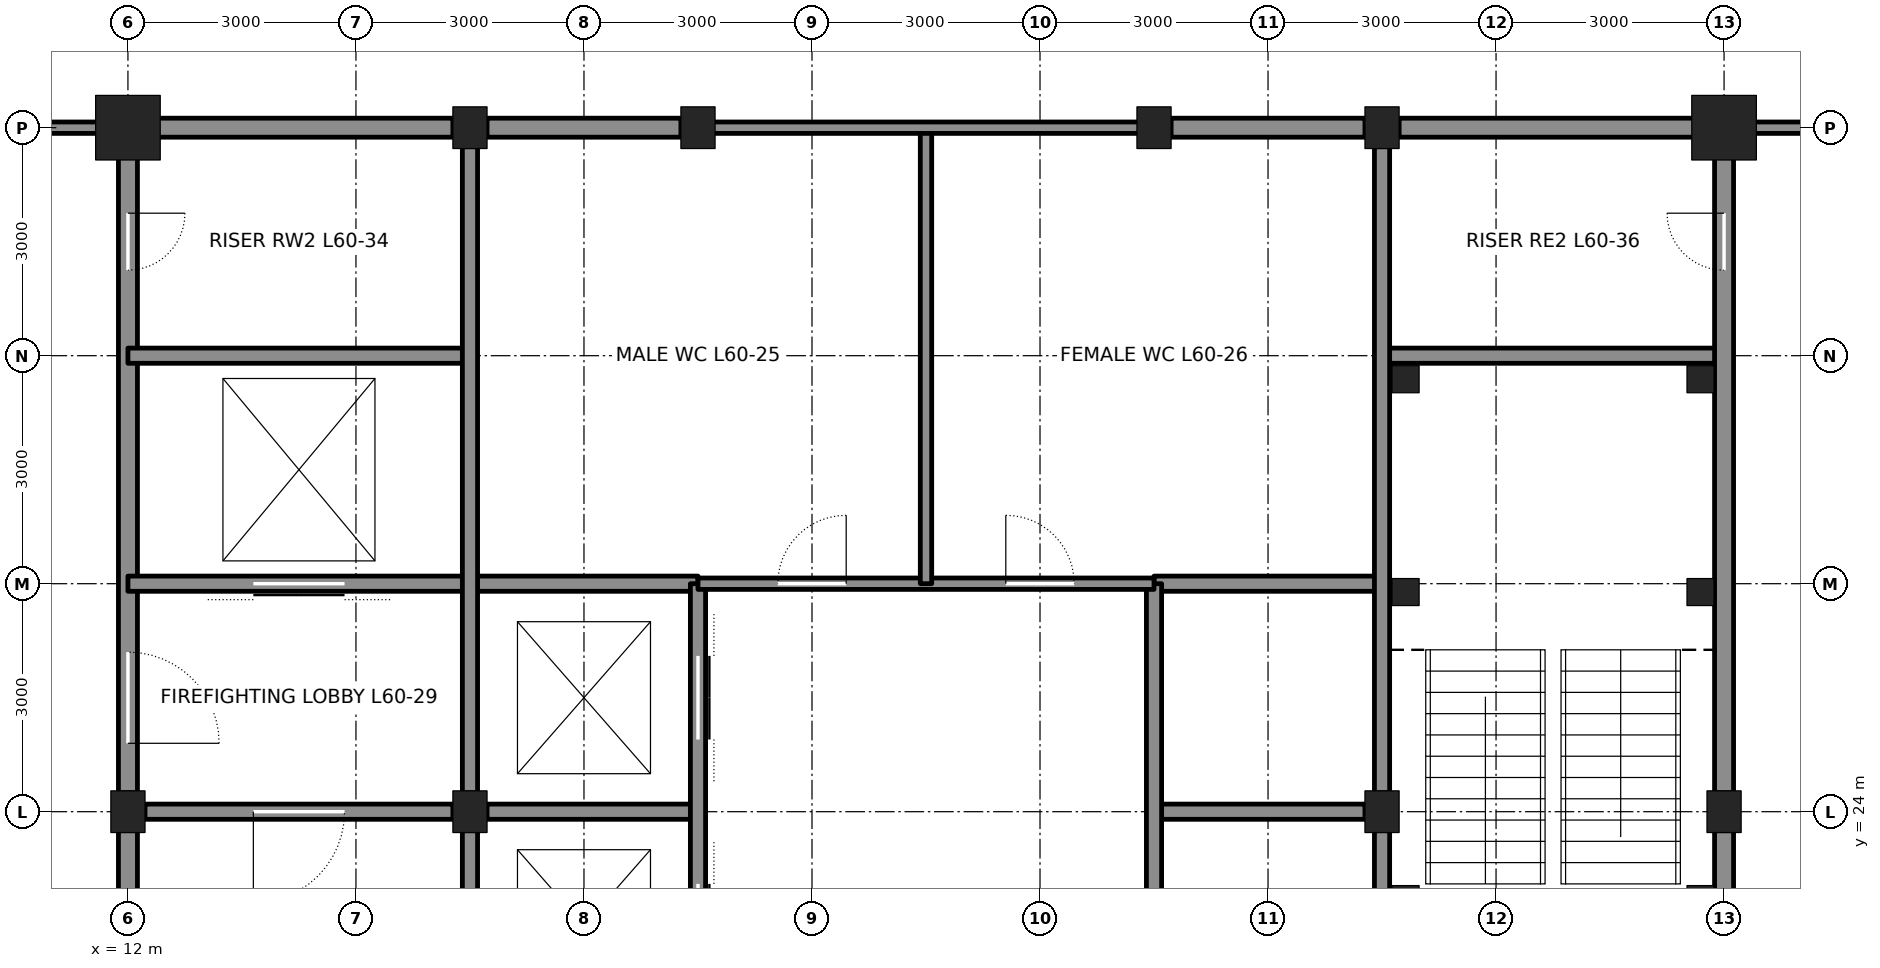
"""IFC4 building model, lengths in metres.
Left out: names, types, materials, properties, quantities, classifications, styles, units other than length and angle.
Written with IfcOpenShell. Run it as: python <this file> out.ifc"""

import sys

from ifc_helpers import new_model, si_unit, direction, frame, frame_2d, origin, origin_2d, place, context, subcontext, project, spatial, rectangle, hollow_rectangle, i_section, extrude, element, fill, save


model = new_model("IFC4")
c1 = context("Model", 3, precision=1e-05, world=origin(), true_north=direction((0.0, 1.0)))
c2 = subcontext(c1, "Body", "Model", "MODEL_VIEW")
j1 = project(units=[si_unit("LENGTHUNIT", "METRE"), si_unit("PLANEANGLEUNIT", "RADIAN")], contexts=[c1])
p1 = place(None, origin())
s1 = spatial("IfcSite", under=j1, at=p1, CompositionType="ELEMENT")
p2 = place(p1, origin())
s2 = spatial("IfcBuilding", under=s1, at=p2, CompositionType="ELEMENT")
p3 = place(p2, frame((0.0, 0.0, 270.6)))
s3 = spatial("IfcBuildingStorey", under=s2, at=p3, CompositionType="ELEMENT", Elevation=270.6)
p4 = place(p3, frame((12.0, 33.0, 0.0), z_axis=(0.0, 0.0, 1.0), x_axis=(1.0, 0.0, 0.0)))
e1 = element("IfcColumn", 1, at=p4, inside=s3, PredefinedType="COLUMN", context=c2, shape_type="SweptSolid", body=[
    extrude(hollow_rectangle(XDim=0.85, YDim=0.85, WallThickness=0.085, at=origin_2d()), origin(), (0.0, 0.0, 1.0), 4.2),
])
for number, where, z_axis, x_axis in (
    (2, (16.5, 33.0, 0.0), (0.0, 0.0, 1.0), (1.0, 0.0, 0.0)),
    (3, (19.5, 33.0, 0.0), (0.0, 0.0, 1.0), (1.0, 0.0, 0.0)),
    (4, (25.5, 33.0, 0.0), (0.0, 0.0, 1.0), (1.0, 0.0, 0.0)),
    (5, (28.5, 33.0, 0.0), (0.0, 0.0, 1.0), (1.0, 0.0, 0.0)),
):
    element("IfcColumn", number, at=place(p3, frame(where, z_axis=z_axis, x_axis=x_axis)), inside=s3, PredefinedType="COLUMN", context=c2, shape_type="SweptSolid", body=[
        extrude(i_section(OverallWidth=0.449, OverallDepth=0.549, WebThickness=0.072, FlangeThickness=0.115, at=origin_2d()), origin(), (0.0, 0.0, 1.0), 4.2),
    ])
p5 = place(p3, frame((33.0, 33.0, 0.0), z_axis=(0.0, 0.0, 1.0), x_axis=(1.0, 0.0, 0.0)))
e6 = element("IfcColumn", 6, at=p5, inside=s3, PredefinedType="COLUMN", context=c2, shape_type="SweptSolid", body=[
    extrude(hollow_rectangle(XDim=0.85, YDim=0.85, WallThickness=0.085, at=origin_2d()), origin(), (0.0, 0.0, 1.0), 4.2),
])
for number, where, z_axis, x_axis in (
    (7, (12.0, 24.0, 0.0), (0.0, 0.0, 1.0), (1.0, 0.0, 0.0)),
    (8, (33.0, 24.0, 0.0), (0.0, 0.0, 1.0), (1.0, 0.0, 0.0)),
    (9, (16.5, 24.0, 0.0), (0.0, 0.0, 1.0), (1.0, 0.0, 0.0)),
    (10, (28.5, 24.0, 0.0), (0.0, 0.0, 1.0), (1.0, 0.0, 0.0)),
):
    element("IfcColumn", number, at=place(p3, frame(where, z_axis=z_axis, x_axis=x_axis)), inside=s3, PredefinedType="COLUMN", context=c2, shape_type="SweptSolid", body=[
        extrude(i_section(OverallWidth=0.449, OverallDepth=0.549, WebThickness=0.072, FlangeThickness=0.115, at=origin_2d()), origin(), (0.0, 0.0, 1.0), 4.2),
    ])
p6 = place(p3, frame((12.0, 21.25, 0.0), z_axis=(0.0, 0.0, 1.0), x_axis=(0.0, 1.0, 0.0)))
e11 = element("IfcWall", 11, at=p6, inside=s3, PredefinedType="SOLIDWALL", context=c2, shape_type="SweptSolid", body=[
    extrude(rectangle(XDim=2.5, YDim=0.25, at=frame_2d((1.25, 0.0))), origin(), (0.0, 0.0, 1.0), 3.113),
])
p7 = place(p3, frame((12.0, 24.25, 0.0), z_axis=(0.0, 0.0, 1.0), x_axis=(0.0, 1.0, 0.0)))
e12 = element("IfcWall", 12, at=p7, inside=s3, PredefinedType="SOLIDWALL", context=c2, shape_type="SweptSolid", body=[
    extrude(rectangle(XDim=8.5, YDim=0.25, at=frame_2d((4.25, 0.0))), origin(), (0.0, 0.0, 1.0), 3.113),
])
p8 = place(p7, frame((0.65, 0.0, 0.0)))
e13 = element("IfcOpeningElement", 13, at=p8, cuts=e12, PredefinedType="OPENING", context=c2, shape_type="SweptSolid", body=[
    extrude(rectangle(XDim=1.2, YDim=2.1, at=frame_2d((0.6, 1.05))), frame((0.0, 0.135, 0.0), z_axis=(0.0, -1.0, 0.0), x_axis=(1.0, 0.0, 0.0)), (0.0, 0.0, 1.0), 0.27),
])
p9 = place(p7, frame((6.875, 0.0, 0.0)))
e14 = element("IfcOpeningElement", 14, at=p9, cuts=e12, PredefinedType="OPENING", context=c2, shape_type="SweptSolid", body=[
    extrude(rectangle(XDim=0.75, YDim=2.1, at=frame_2d((0.375, 1.05))), frame((0.0, 0.135, 0.0), z_axis=(0.0, -1.0, 0.0), x_axis=(1.0, 0.0, 0.0)), (0.0, 0.0, 1.0), 0.27),
])
p10 = place(p3, frame((12.225, 24.0, 0.0), z_axis=(0.0, 0.0, 1.0), x_axis=(1.0, 0.0, 0.0)))
e15 = element("IfcWall", 15, at=p10, inside=s3, PredefinedType="SOLIDWALL", context=c2, shape_type="SweptSolid", body=[
    extrude(rectangle(XDim=4.05, YDim=0.2, at=frame_2d((2.025, 0.0))), origin(), (0.0, 0.0, 1.0), 3.09),
])
p11 = place(p10, frame((1.425, 0.0, 0.0)))
e16 = element("IfcOpeningElement", 16, at=p11, cuts=e15, PredefinedType="OPENING", context=c2, shape_type="SweptSolid", body=[
    extrude(rectangle(XDim=1.2, YDim=2.1, at=frame_2d((0.6, 1.05))), frame((0.0, 0.11, 0.0), z_axis=(0.0, -1.0, 0.0), x_axis=(1.0, 0.0, 0.0)), (0.0, 0.0, 1.0), 0.22),
])
for number, where, z_axis, x_axis in (
    (17, (16.725, 24.0, 0.0), (0.0, 0.0, 1.0), (1.0, 0.0, 0.0)),
    (18, (25.5, 24.0, 0.0), (0.0, 0.0, 1.0), (1.0, 0.0, 0.0)),
):
    element("IfcWall", number, at=place(p3, frame(where, z_axis=z_axis, x_axis=x_axis)), inside=s3, PredefinedType="SOLIDWALL", context=c2, shape_type="SweptSolid", body=[
        extrude(rectangle(XDim=2.775, YDim=0.2, at=frame_2d((1.388, 0.0))), origin(), (0.0, 0.0, 1.0), 3.09),
    ])
p12 = place(p3, frame((12.0, 27.0, 0.0), z_axis=(0.0, 0.0, 1.0), x_axis=(1.0, 0.0, 0.0)))
e19 = element("IfcWall", 19, at=p12, inside=s3, PredefinedType="SOLIDWALL", context=c2, shape_type="SweptSolid", body=[
    extrude(rectangle(XDim=7.5, YDim=0.2, at=frame_2d((3.75, 0.0))), origin(), (0.0, 0.0, 1.0), 4.04),
])
p13 = place(p12, frame((1.65, 0.0, 0.0)))
e20 = element("IfcOpeningElement", 20, at=p13, cuts=e19, PredefinedType="OPENING", context=c2, shape_type="SweptSolid", body=[
    extrude(rectangle(XDim=1.2, YDim=2.1, at=frame_2d((0.6, 1.05))), frame((0.0, 0.11, 0.0), z_axis=(0.0, -1.0, 0.0), x_axis=(1.0, 0.0, 0.0)), (0.0, 0.0, 1.0), 0.22),
])
p14 = place(p3, frame((25.5, 27.0, 0.0), z_axis=(0.0, 0.0, 1.0), x_axis=(1.0, 0.0, 0.0)))
e21 = element("IfcWall", 21, at=p14, inside=s3, PredefinedType="SOLIDWALL", context=c2, shape_type="SweptSolid", body=[
    extrude(rectangle(XDim=3.0, YDim=0.2, at=frame_2d((1.5, 0.0))), origin(), (0.0, 0.0, 1.0), 4.04),
])
for number, where, z_axis, x_axis in (
    (22, (12.0, 30.0, 0.0), (0.0, 0.0, 1.0), (1.0, 0.0, 0.0)),
    (23, (28.5, 30.0, 0.0), (0.0, 0.0, 1.0), (1.0, 0.0, 0.0)),
):
    element("IfcWall", number, at=place(p3, frame(where, z_axis=z_axis, x_axis=x_axis)), inside=s3, PredefinedType="SOLIDWALL", context=c2, shape_type="SweptSolid", body=[
        extrude(rectangle(XDim=4.5, YDim=0.2, at=frame_2d((2.25, 0.0))), origin(), (0.0, 0.0, 1.0), 4.04),
    ])
p15 = place(p3, frame((12.25, 33.0, 0.0), z_axis=(0.0, 0.0, 1.0), x_axis=(1.0, 0.0, 0.0)))
e24 = element("IfcWall", 24, at=p15, inside=s3, PredefinedType="SOLIDWALL", context=c2, shape_type="SweptSolid", body=[
    extrude(rectangle(XDim=4.025, YDim=0.25, at=frame_2d((2.013, 0.0))), origin(), (0.0, 0.0, 1.0), 3.181),
])
for number, where, z_axis, x_axis in (
    (25, (16.725, 33.0, 0.0), (0.0, 0.0, 1.0), (1.0, 0.0, 0.0)),
    (26, (25.725, 33.0, 0.0), (0.0, 0.0, 1.0), (1.0, 0.0, 0.0)),
):
    element("IfcWall", number, at=place(p3, frame(where, z_axis=z_axis, x_axis=x_axis)), inside=s3, PredefinedType="SOLIDWALL", context=c2, shape_type="SweptSolid", body=[
        extrude(rectangle(XDim=2.55, YDim=0.25, at=frame_2d((1.275, 0.0))), origin(), (0.0, 0.0, 1.0), 3.181),
    ])
p16 = place(p3, frame((28.725, 33.0, 0.0), z_axis=(0.0, 0.0, 1.0), x_axis=(1.0, 0.0, 0.0)))
e27 = element("IfcWall", 27, at=p16, inside=s3, PredefinedType="SOLIDWALL", context=c2, shape_type="SweptSolid", body=[
    extrude(rectangle(XDim=4.025, YDim=0.25, at=frame_2d((2.013, 0.0))), origin(), (0.0, 0.0, 1.0), 3.181),
])
p17 = place(p3, frame((16.5, 21.25, 0.0), z_axis=(0.0, 0.0, 1.0), x_axis=(0.0, 1.0, 0.0)))
e28 = element("IfcWall", 28, at=p17, inside=s3, PredefinedType="SOLIDWALL", context=c2, shape_type="SweptSolid", body=[
    extrude(rectangle(XDim=2.5, YDim=0.2, at=frame_2d((1.25, 0.0))), origin(), (0.0, 0.0, 1.0), 3.113),
])
p18 = place(p3, frame((16.5, 24.25, 0.0), z_axis=(0.0, 0.0, 1.0), x_axis=(0.0, 1.0, 0.0)))
e29 = element("IfcWall", 29, at=p18, inside=s3, PredefinedType="SOLIDWALL", context=c2, shape_type="SweptSolid", body=[
    extrude(rectangle(XDim=8.5, YDim=0.2, at=frame_2d((4.25, 0.0))), origin(), (0.0, 0.0, 1.0), 3.113),
])
p19 = place(p3, frame((19.5, 15.0, 0.0), z_axis=(0.0, 0.0, 1.0), x_axis=(0.0, 1.0, 0.0)))
e30 = element("IfcWall", 30, at=p19, inside=s3, PredefinedType="SOLIDWALL", context=c2, shape_type="SweptSolid", body=[
    extrude(rectangle(XDim=12.0, YDim=0.2, at=frame_2d((6.0, 0.0))), origin(), (0.0, 0.0, 1.0), 3.064),
])
p20 = place(p19, frame((0.95, 0.0, 0.0)))
e31 = element("IfcOpeningElement", 31, at=p20, cuts=e30, PredefinedType="OPENING", context=c2, shape_type="SweptSolid", body=[
    extrude(rectangle(XDim=1.1, YDim=2.1, at=frame_2d((0.55, 1.05))), frame((0.0, 0.11, 0.0), z_axis=(0.0, -1.0, 0.0), x_axis=(1.0, 0.0, 0.0)), (0.0, 0.0, 1.0), 0.22),
])
p21 = place(p19, frame((3.95, 0.0, 0.0)))
e32 = element("IfcOpeningElement", 32, at=p21, cuts=e30, PredefinedType="OPENING", context=c2, shape_type="SweptSolid", body=[
    extrude(rectangle(XDim=1.1, YDim=2.1, at=frame_2d((0.55, 1.05))), frame((0.0, 0.11, 0.0), z_axis=(0.0, -1.0, 0.0), x_axis=(1.0, 0.0, 0.0)), (0.0, 0.0, 1.0), 0.22),
])
p22 = place(p19, frame((6.95, 0.0, 0.0)))
e33 = element("IfcOpeningElement", 33, at=p22, cuts=e30, PredefinedType="OPENING", context=c2, shape_type="SweptSolid", body=[
    extrude(rectangle(XDim=1.1, YDim=2.1, at=frame_2d((0.55, 1.05))), frame((0.0, 0.11, 0.0), z_axis=(0.0, -1.0, 0.0), x_axis=(1.0, 0.0, 0.0)), (0.0, 0.0, 1.0), 0.22),
])
p23 = place(p19, frame((9.95, 0.0, 0.0)))
e34 = element("IfcOpeningElement", 34, at=p23, cuts=e30, PredefinedType="OPENING", context=c2, shape_type="SweptSolid", body=[
    extrude(rectangle(XDim=1.1, YDim=2.1, at=frame_2d((0.55, 1.05))), frame((0.0, 0.11, 0.0), z_axis=(0.0, -1.0, 0.0), x_axis=(1.0, 0.0, 0.0)), (0.0, 0.0, 1.0), 0.22),
])
p24 = place(p3, frame((25.5, 15.0, 0.0), z_axis=(0.0, 0.0, 1.0), x_axis=(0.0, 1.0, 0.0)))
e35 = element("IfcWall", 35, at=p24, inside=s3, PredefinedType="SOLIDWALL", context=c2, shape_type="SweptSolid", body=[
    extrude(rectangle(XDim=12.0, YDim=0.2, at=frame_2d((6.0, 0.0))), origin(), (0.0, 0.0, 1.0), 3.064),
])
p25 = place(p24, frame((1.8, 0.0, 0.0)))
e36 = element("IfcOpeningElement", 36, at=p25, cuts=e35, PredefinedType="OPENING", context=c2, shape_type="SweptSolid", body=[
    extrude(rectangle(XDim=0.9, YDim=2.1, at=frame_2d((0.45, 1.05))), frame((0.0, 0.11, 0.0), z_axis=(0.0, -1.0, 0.0), x_axis=(1.0, 0.0, 0.0)), (0.0, 0.0, 1.0), 0.22),
])
p26 = place(p24, frame((4.8, 0.0, 0.0)))
e37 = element("IfcOpeningElement", 37, at=p26, cuts=e35, PredefinedType="OPENING", context=c2, shape_type="SweptSolid", body=[
    extrude(rectangle(XDim=0.9, YDim=2.1, at=frame_2d((0.45, 1.05))), frame((0.0, 0.11, 0.0), z_axis=(0.0, -1.0, 0.0), x_axis=(1.0, 0.0, 0.0)), (0.0, 0.0, 1.0), 0.22),
])
p27 = place(p3, frame((28.5, 21.25, 0.0), z_axis=(0.0, 0.0, 1.0), x_axis=(0.0, 1.0, 0.0)))
e38 = element("IfcWall", 38, at=p27, inside=s3, PredefinedType="SOLIDWALL", context=c2, shape_type="SweptSolid", body=[
    extrude(rectangle(XDim=2.5, YDim=0.2, at=frame_2d((1.25, 0.0))), origin(), (0.0, 0.0, 1.0), 3.113),
])
p28 = place(p3, frame((28.5, 24.25, 0.0), z_axis=(0.0, 0.0, 1.0), x_axis=(0.0, 1.0, 0.0)))
e39 = element("IfcWall", 39, at=p28, inside=s3, PredefinedType="SOLIDWALL", context=c2, shape_type="SweptSolid", body=[
    extrude(rectangle(XDim=8.5, YDim=0.2, at=frame_2d((4.25, 0.0))), origin(), (0.0, 0.0, 1.0), 3.113),
])
p29 = place(p3, frame((33.0, 21.25, 0.0), z_axis=(0.0, 0.0, 1.0), x_axis=(0.0, 1.0, 0.0)))
e40 = element("IfcWall", 40, at=p29, inside=s3, PredefinedType="SOLIDWALL", context=c2, shape_type="SweptSolid", body=[
    extrude(rectangle(XDim=2.5, YDim=0.25, at=frame_2d((1.25, 0.0))), origin(), (0.0, 0.0, 1.0), 3.113),
])
p30 = place(p3, frame((33.0, 24.25, 0.0), z_axis=(0.0, 0.0, 1.0), x_axis=(0.0, 1.0, 0.0)))
e41 = element("IfcWall", 41, at=p30, inside=s3, PredefinedType="SOLIDWALL", context=c2, shape_type="SweptSolid", body=[
    extrude(rectangle(XDim=8.5, YDim=0.25, at=frame_2d((4.25, 0.0))), origin(), (0.0, 0.0, 1.0), 3.113),
])
p31 = place(p30, frame((6.875, 0.0, 0.0)))
e42 = element("IfcOpeningElement", 42, at=p31, cuts=e41, PredefinedType="OPENING", context=c2, shape_type="SweptSolid", body=[
    extrude(rectangle(XDim=0.75, YDim=2.1, at=frame_2d((0.375, 1.05))), frame((0.0, 0.135, 0.0), z_axis=(0.0, -1.0, 0.0), x_axis=(1.0, 0.0, 0.0)), (0.0, 0.0, 1.0), 0.27),
])
p32 = place(p3, frame((19.5, 27.0, 0.0), z_axis=(0.0, 0.0, 1.0), x_axis=(1.0, 0.0, 0.0)))
e43 = element("IfcWall", 43, at=p32, inside=s3, PredefinedType="PARTITIONING", context=c2, shape_type="SweptSolid", body=[
    extrude(rectangle(XDim=6.0, YDim=0.15, at=frame_2d((3.0, 0.0))), origin(), (0.0, 0.0, 1.0), 4.04),
])
p33 = place(p32, frame((1.05, 0.0, 0.0)))
e44 = element("IfcOpeningElement", 44, at=p33, cuts=e43, PredefinedType="OPENING", context=c2, shape_type="SweptSolid", body=[
    extrude(rectangle(XDim=0.9, YDim=2.1, at=frame_2d((0.45, 1.05))), frame((0.0, 0.085, 0.0), z_axis=(0.0, -1.0, 0.0), x_axis=(1.0, 0.0, 0.0)), (0.0, 0.0, 1.0), 0.17),
])
p34 = place(p32, frame((4.05, 0.0, 0.0)))
e45 = element("IfcOpeningElement", 45, at=p34, cuts=e43, PredefinedType="OPENING", context=c2, shape_type="SweptSolid", body=[
    extrude(rectangle(XDim=0.9, YDim=2.1, at=frame_2d((0.45, 1.05))), frame((0.0, 0.085, 0.0), z_axis=(0.0, -1.0, 0.0), x_axis=(1.0, 0.0, 0.0)), (0.0, 0.0, 1.0), 0.17),
])
p35 = place(p3, frame((22.5, 27.0, 0.0), z_axis=(0.0, 0.0, 1.0), x_axis=(0.0, 1.0, 0.0)))
e46 = element("IfcWall", 46, at=p35, inside=s3, PredefinedType="PARTITIONING", context=c2, shape_type="SweptSolid", body=[
    extrude(rectangle(XDim=6.0, YDim=0.15, at=frame_2d((3.0, 0.0))), origin(), (0.0, 0.0, 1.0), 4.04),
])
p36 = place(p3, frame((19.5, 33.0, 0.0), z_axis=(0.0, 0.0, 1.0), x_axis=(1.0, 0.0, 0.0)))
e47 = element("IfcWall", 47, at=p36, inside=s3, PredefinedType="PARTITIONING", context=c2, shape_type="SweptSolid", body=[
    extrude(rectangle(XDim=6.0, YDim=0.15, at=frame_2d((3.0, 0.0))), origin(), (0.0, 0.0, 1.0), 3.181),
])
for number, where, z_axis, x_axis in (
    (48, (10.2, 33.0, 0.0), (0.0, 0.0, 1.0), (1.0, 0.0, 0.0)),
    (49, (33.0, 33.0, 0.0), (0.0, 0.0, 1.0), (1.0, 0.0, 0.0)),
):
    element("IfcWall", number, at=place(p3, frame(where, z_axis=z_axis, x_axis=x_axis)), inside=s3, PredefinedType="PARTITIONING", context=c2, shape_type="SweptSolid", body=[
        extrude(rectangle(XDim=1.8, YDim=0.15, at=frame_2d((0.9, 0.0))), origin(), (0.0, 0.0, 1.0), 3.27),
    ])
for number, where, z_axis, x_axis in (
    (50, (28.81, 29.69, 0.0), (0.0, 0.0, 1.0), (1.0, 0.0, 0.0)),
    (51, (32.69, 29.69, 0.0), (0.0, 0.0, 1.0), (1.0, 0.0, 0.0)),
    (52, (28.81, 26.89, 0.0), (0.0, 0.0, 1.0), (1.0, 0.0, 0.0)),
    (53, (32.69, 26.89, 0.0), (0.0, 0.0, 1.0), (1.0, 0.0, 0.0)),
    (54, (28.81, 22.85, 0.0), (0.0, 0.0, 1.0), (1.0, 0.0, 0.0)),
    (55, (32.69, 22.85, 0.0), (0.0, 0.0, 1.0), (1.0, 0.0, 0.0)),
):
    element("IfcColumn", number, at=place(p3, frame(where, z_axis=z_axis, x_axis=x_axis)), inside=s3, PredefinedType="COLUMN", context=c2, shape_type="SweptSolid", body=[
        extrude(hollow_rectangle(XDim=0.356, YDim=0.356, WallThickness=0.009, at=origin_2d()), origin(), (0.0, 0.0, 1.0), 4.2),
    ])
p37 = place(p11, frame((1.2, 0.0, 0.0), z_axis=(0.0, 0.0, 1.0), x_axis=(-1.0, 0.0, 0.0)))
e56 = element("IfcDoor", 56, at=p37, inside=s3, OperationType="SINGLE_SWING_RIGHT", PredefinedType="DOOR", context=c2, shape_type="SweptSolid", body=[
    extrude(rectangle(XDim=1.2, YDim=2.1, at=frame_2d((0.6, 1.05))), frame((0.0, 0.025, 0.0), z_axis=(0.0, -1.0, 0.0), x_axis=(1.0, 0.0, 0.0)), (0.0, 0.0, 1.0), 0.05),
])
fill(e16, e56)
p38 = place(p8, frame((1.2, 0.0, 0.0), z_axis=(0.0, 0.0, 1.0), x_axis=(-1.0, 0.0, 0.0)))
e57 = element("IfcDoor", 57, at=p38, inside=s3, OperationType="SINGLE_SWING_RIGHT", PredefinedType="DOOR", context=c2, shape_type="SweptSolid", body=[
    extrude(rectangle(XDim=1.2, YDim=2.1, at=frame_2d((0.6, 1.05))), frame((0.0, 0.025, 0.0), z_axis=(0.0, -1.0, 0.0), x_axis=(1.0, 0.0, 0.0)), (0.0, 0.0, 1.0), 0.05),
])
fill(e13, e57)
p39 = place(p13, origin())
e58 = element("IfcDoor", 58, at=p39, inside=s3, OperationType="DOUBLE_DOOR_SLIDING", PredefinedType="DOOR", context=c2, shape_type="SweptSolid", body=[
    extrude(rectangle(XDim=1.2, YDim=2.1, at=frame_2d((0.6, 1.05))), frame((0.0, 0.025, 0.0), z_axis=(0.0, -1.0, 0.0), x_axis=(1.0, 0.0, 0.0)), (0.0, 0.0, 1.0), 0.05),
])
fill(e20, e58)
p40 = place(p9, frame((0.75, 0.0, 0.0), z_axis=(0.0, 0.0, 1.0), x_axis=(-1.0, 0.0, 0.0)))
e59 = element("IfcDoor", 59, at=p40, inside=s3, OperationType="SINGLE_SWING_LEFT", PredefinedType="DOOR", context=c2, shape_type="SweptSolid", body=[
    extrude(rectangle(XDim=0.75, YDim=2.1, at=frame_2d((0.375, 1.05))), frame((0.0, 0.025, 0.0), z_axis=(0.0, -1.0, 0.0), x_axis=(1.0, 0.0, 0.0)), (0.0, 0.0, 1.0), 0.05),
])
fill(e14, e59)
p41 = place(p31, origin())
e60 = element("IfcDoor", 60, at=p41, inside=s3, OperationType="SINGLE_SWING_RIGHT", PredefinedType="DOOR", context=c2, shape_type="SweptSolid", body=[
    extrude(rectangle(XDim=0.75, YDim=2.1, at=frame_2d((0.375, 1.05))), frame((0.0, 0.025, 0.0), z_axis=(0.0, -1.0, 0.0), x_axis=(1.0, 0.0, 0.0)), (0.0, 0.0, 1.0), 0.05),
])
fill(e42, e60)
p42 = place(p33, origin())
e61 = element("IfcDoor", 61, at=p42, inside=s3, OperationType="SINGLE_SWING_RIGHT", PredefinedType="DOOR", context=c2, shape_type="SweptSolid", body=[
    extrude(rectangle(XDim=0.9, YDim=2.1, at=frame_2d((0.45, 1.05))), frame((0.0, 0.025, 0.0), z_axis=(0.0, -1.0, 0.0), x_axis=(1.0, 0.0, 0.0)), (0.0, 0.0, 1.0), 0.05),
])
fill(e44, e61)
p43 = place(p34, origin())
e62 = element("IfcDoor", 62, at=p43, inside=s3, OperationType="SINGLE_SWING_LEFT", PredefinedType="DOOR", context=c2, shape_type="SweptSolid", body=[
    extrude(rectangle(XDim=0.9, YDim=2.1, at=frame_2d((0.45, 1.05))), frame((0.0, 0.025, 0.0), z_axis=(0.0, -1.0, 0.0), x_axis=(1.0, 0.0, 0.0)), (0.0, 0.0, 1.0), 0.05),
])
fill(e45, e62)
p44 = place(p22, origin())
e63 = element("IfcDoor", 63, at=p44, inside=s3, OperationType="DOUBLE_DOOR_SLIDING", PredefinedType="DOOR", context=c2, shape_type="SweptSolid", body=[
    extrude(rectangle(XDim=1.1, YDim=2.1, at=frame_2d((0.55, 1.05))), frame((0.0, 0.025, 0.0), z_axis=(0.0, -1.0, 0.0), x_axis=(1.0, 0.0, 0.0)), (0.0, 0.0, 1.0), 0.05),
])
fill(e33, e63)
p45 = place(p23, origin())
e64 = element("IfcDoor", 64, at=p45, inside=s3, OperationType="DOUBLE_DOOR_SLIDING", PredefinedType="DOOR", context=c2, shape_type="SweptSolid", body=[
    extrude(rectangle(XDim=1.1, YDim=2.1, at=frame_2d((0.55, 1.05))), frame((0.0, 0.025, 0.0), z_axis=(0.0, -1.0, 0.0), x_axis=(1.0, 0.0, 0.0)), (0.0, 0.0, 1.0), 0.05),
])
fill(e34, e64)
save(model, sys.argv[1])
